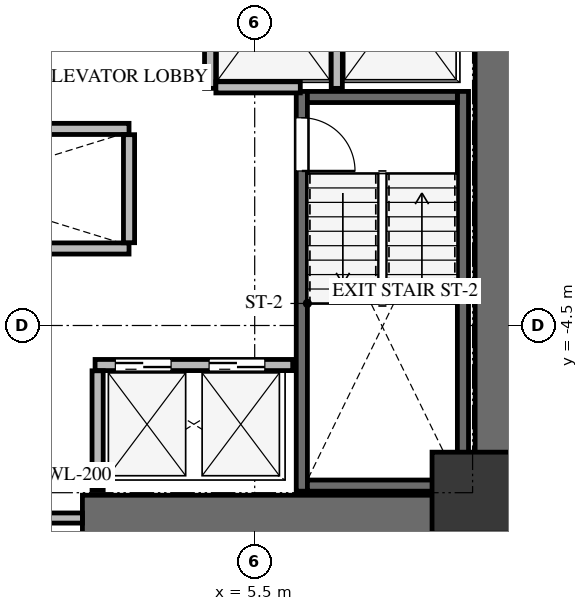
"""IFC4 building model, lengths in metres.
Left out: names, types, materials, properties, quantities, classifications, styles, units other than length and angle.
Written with IfcOpenShell. Run it as: python <this file> out.ifc"""

import sys

from ifc_helpers import new_model, si_unit, direction, frame, frame_2d, origin, origin_2d, place, context, subcontext, project, spatial, rectangle, extrude, source, transform, mapped, element, fill, save


model = new_model("IFC4")
c1 = context("Model", 3, precision=1e-05, world=origin(), true_north=direction((0.0, 1.0)))
c2 = subcontext(c1, "Body", "Model", "MODEL_VIEW")
j1 = project(units=[si_unit("LENGTHUNIT", "METRE"), si_unit("PLANEANGLEUNIT", "RADIAN")], contexts=[c1])
p1 = place(None, origin())
s1 = spatial("IfcSite", under=j1, at=p1, CompositionType="ELEMENT")
p2 = place(p1, origin())
s2 = spatial("IfcBuilding", under=s1, at=p2, CompositionType="ELEMENT")
p3 = place(p2, frame((0.0, 0.0, 42.3)))
s3 = spatial("IfcBuildingStorey", under=s2, at=p3, CompositionType="ELEMENT", Elevation=42.3)
p4 = place(p3, frame((10.3, -8.75, 0.0), z_axis=(0.0, 0.0, 1.0), x_axis=(0.0, 1.0, 0.0)))
e1 = element("IfcWall", 1, at=p4, inside=s3, PredefinedType="SHEAR", context=c2, shape_type="SweptSolid", body=[
    extrude(rectangle(XDim=17.5, YDim=0.9, at=frame_2d((8.75, 0.0))), origin(), (0.0, 0.0, 1.0), 3.3),
])
p5 = place(p3, frame((2.1, -8.3, 0.0), z_axis=(0.0, 0.0, 1.0), x_axis=(1.0, 0.0, 0.0)))
e2 = element("IfcWall", 2, at=p5, inside=s3, PredefinedType="SHEAR", context=c2, shape_type="SweptSolid", body=[
    extrude(rectangle(XDim=7.75, YDim=0.9, at=frame_2d((3.875, 0.0))), origin(), (0.0, 0.0, 1.0), 3.3),
])
p6 = place(p3, frame((9.61, -7.77, -0.24), z_axis=(0.0, 0.0, 1.0), x_axis=(0.0, 1.0, 0.0)))
e3 = element("IfcWall", 3, at=p6, inside=s3, PredefinedType="SHEAR", context=c2, shape_type="SweptSolid", body=[
    extrude(rectangle(XDim=7.89, YDim=0.22, at=frame_2d((3.945, 0.0))), origin(), (0.0, 0.0, 1.0), 3.3),
])
p7 = place(p3, frame((6.43, 0.12, -0.24), z_axis=(0.0, 0.0, 1.0), x_axis=(0.0, -1.0, 0.0)))
e4 = element("IfcWall", 4, at=p7, inside=s3, PredefinedType="SHEAR", context=c2, shape_type="SweptSolid", body=[
    extrude(rectangle(XDim=7.89, YDim=0.22, at=frame_2d((3.945, 0.0))), origin(), (0.0, 0.0, 1.0), 3.3),
])
p8 = place(p7, frame((0.52, 0.0, 0.0)))
e5 = element("IfcOpeningElement", 5, at=p8, cuts=e4, PredefinedType="OPENING", context=c2, shape_type="SweptSolid", body=[
    extrude(rectangle(XDim=1.05, YDim=2.15, at=frame_2d((0.525, 1.075))), frame((0.0, 0.12, 0.0), z_axis=(0.0, -1.0, 0.0), x_axis=(1.0, 0.0, 0.0)), (0.0, 0.0, 1.0), 0.24),
])
for number, where, z_axis, x_axis in (
    (6, (6.54, -7.66, -0.24), (0.0, 0.0, 1.0), (1.0, 0.0, 0.0)),
    (7, (9.5, 0.01, -0.24), (0.0, 0.0, 1.0), (-1.0, 0.0, 0.0)),
):
    element("IfcWall", number, at=place(p3, frame(where, z_axis=z_axis, x_axis=x_axis)), inside=s3, PredefinedType="SHEAR", context=c2, shape_type="SweptSolid", body=[
        extrude(rectangle(XDim=2.96, YDim=0.22, at=frame_2d((1.48, 0.0))), origin(), (0.0, 0.0, 1.0), 3.3),
    ])
m1 = source(origin(), c2, "Body", "SweptSolid", [
    extrude(rectangle(XDim=1.6, YDim=1.6, at=origin_2d()), origin(), (0.0, 0.0, 1.0), 3.3),
])
p9 = place(p3, frame((9.8, -7.8, -0.24), z_axis=(0.0, 0.0, 1.0), x_axis=(1.0, 0.0, 0.0)))
e8 = element("IfcColumn", 8, at=p9, inside=s3, PredefinedType="COLUMN", context=c2, shape_type="MappedRepresentation", body=[
    mapped(m1, transform((0.0, 0.0, 0.0), x_axis=(1.0, 0.0, 0.0), y_axis=(0.0, 1.0, 0.0), z_axis=(0.0, 0.0, 1.0), scale=1.0)),
])
p10 = place(p3, frame((-2.1, -8.3, 0.0), z_axis=(0.0, 0.0, 1.0), x_axis=(1.0, 0.0, 0.0)))
e9 = element("IfcWall", 9, at=p10, inside=s3, PredefinedType="SOLIDWALL", context=c2, shape_type="SweptSolid", body=[
    extrude(rectangle(XDim=4.2, YDim=0.2, at=frame_2d((2.1, 0.0))), origin(), (0.0, 0.0, 1.0), 3.045),
])
p11 = place(p10, frame((1.2, 0.0, 0.0)))
e10 = element("IfcOpeningElement", 10, at=p11, cuts=e9, PredefinedType="OPENING", context=c2, shape_type="SweptSolid", body=[
    extrude(rectangle(XDim=1.8, YDim=2.15, at=frame_2d((0.9, 1.075))), frame((0.0, 0.11, 0.0), z_axis=(0.0, -1.0, 0.0), x_axis=(1.0, 0.0, 0.0)), (0.0, 0.0, 1.0), 0.22),
])
for number, where, z_axis, x_axis in (
    (11, (4.62, 0.18, 0.0), (0.0, 0.0, 1.0), (0.0, 1.0, 0.0)),
    (12, (7.12, 0.18, 0.0), (0.0, 0.0, 1.0), (0.0, 1.0, 0.0)),
):
    element("IfcWall", number, at=place(p3, frame(where, z_axis=z_axis, x_axis=x_axis)), inside=s3, PredefinedType="SOLIDWALL", context=c2, shape_type="SweptSolid", body=[
        extrude(rectangle(XDim=3.186, YDim=0.22, at=frame_2d((1.593, 0.0))), origin(), (0.0, 0.0, 1.0), 3.045),
    ])
p12 = place(p3, frame((4.734, 0.2, 0.0), z_axis=(0.0, 0.0, 1.0), x_axis=(1.0, 0.0, 0.0)))
e13 = element("IfcWall", 13, at=p12, inside=s3, PredefinedType="SOLIDWALL", context=c2, shape_type="SweptSolid", body=[
    extrude(rectangle(XDim=1.666, YDim=0.22, at=frame_2d((0.833, 0.0))), origin(), (0.0, 0.0, 1.0), 3.045),
])
p13 = place(p3, frame((2.35, -5.28, 0.0), z_axis=(0.0, 0.0, 1.0), x_axis=(1.0, 0.0, 0.0)))
e14 = element("IfcWall", 14, at=p13, inside=s3, PredefinedType="SOLIDWALL", context=c2, shape_type="SweptSolid", body=[
    extrude(rectangle(XDim=3.9, YDim=0.22, at=frame_2d((1.95, 0.0))), origin(), (0.0, 0.0, 1.0), 3.045),
])
p14 = place(p13, frame((0.4, 0.0, 0.0)))
e15 = element("IfcOpeningElement", 15, at=p14, cuts=e14, PredefinedType="OPENING", context=c2, shape_type="SweptSolid", body=[
    extrude(rectangle(XDim=1.1, YDim=2.15, at=frame_2d((0.55, 1.075))), frame((0.0, 0.12, 0.0), z_axis=(0.0, -1.0, 0.0), x_axis=(1.0, 0.0, 0.0)), (0.0, 0.0, 1.0), 0.24),
])
p15 = place(p13, frame((2.25, 0.0, 0.0)))
e16 = element("IfcOpeningElement", 16, at=p15, cuts=e14, PredefinedType="OPENING", context=c2, shape_type="SweptSolid", body=[
    extrude(rectangle(XDim=1.1, YDim=2.15, at=frame_2d((0.55, 1.075))), frame((0.0, 0.12, 0.0), z_axis=(0.0, -1.0, 0.0), x_axis=(1.0, 0.0, 0.0)), (0.0, 0.0, 1.0), 0.24),
])
p16 = place(p3, frame((2.4, -7.75, 0.0), z_axis=(0.0, 0.0, 1.0), x_axis=(0.0, 1.0, 0.0)))
e17 = element("IfcWall", 17, at=p16, inside=s3, PredefinedType="SOLIDWALL", context=c2, shape_type="SweptSolid", body=[
    extrude(rectangle(XDim=2.356, YDim=0.22, at=frame_2d((1.178, 0.0))), origin(), (0.0, 0.0, 1.0), 3.045),
])
for number, where, z_axis, x_axis in (
    (18, (-4.22, -2.98, 0.0), (0.0, 0.0, 1.0), (1.0, 0.0, 0.0)),
    (19, (-4.22, -0.62, 0.0), (0.0, 0.0, 1.0), (1.0, 0.0, 0.0)),
):
    element("IfcWall", number, at=place(p3, frame(where, z_axis=z_axis, x_axis=x_axis)), inside=s3, PredefinedType="SOLIDWALL", context=c2, shape_type="SweptSolid", body=[
        extrude(rectangle(XDim=7.24, YDim=0.22, at=frame_2d((3.62, 0.0))), origin(), (0.0, 0.0, 1.0), 3.045),
    ])
p17 = place(p3, frame((3.02, -2.866, 0.0), z_axis=(0.0, 0.0, 1.0), x_axis=(0.0, 1.0, 0.0)))
e20 = element("IfcWall", 20, at=p17, inside=s3, PredefinedType="SOLIDWALL", context=c2, shape_type="SweptSolid", body=[
    extrude(rectangle(XDim=2.132, YDim=0.22, at=frame_2d((1.066, 0.0))), origin(), (0.0, 0.0, 1.0), 3.045),
])
m2 = source(origin(), c2, "Body", "SweptSolid", [
    extrude(rectangle(XDim=1.05, YDim=2.15, at=frame_2d((0.525, 1.075))), frame((0.0, 0.025, 0.0), z_axis=(0.0, -1.0, 0.0), x_axis=(1.0, 0.0, 0.0)), (0.0, 0.0, 1.0), 0.05),
])
p18 = place(p8, origin())
e21 = element("IfcDoor", 21, at=p18, inside=s3, OperationType="SINGLE_SWING_RIGHT", PredefinedType="DOOR", context=c2, shape_type="MappedRepresentation", body=[
    mapped(m2, transform((0.0, 0.0, 0.0), x_axis=(1.0, 0.0, 0.0), y_axis=(0.0, 1.0, 0.0), z_axis=(0.0, 0.0, 1.0), scale=1.0)),
])
fill(e5, e21)
m3 = source(origin(), c2, "Body", "SweptSolid", [
    extrude(rectangle(XDim=1.1, YDim=2.15, at=frame_2d((0.55, 1.075))), frame((0.0, 0.025, 0.0), z_axis=(0.0, -1.0, 0.0), x_axis=(1.0, 0.0, 0.0)), (0.0, 0.0, 1.0), 0.05),
])
p19 = place(p14, origin())
e22 = element("IfcDoor", 22, at=p19, inside=s3, OperationType="DOUBLE_DOOR_SLIDING", PredefinedType="DOOR", context=c2, shape_type="MappedRepresentation", body=[
    mapped(m3, transform((0.0, 0.0, 0.0), x_axis=(1.0, 0.0, 0.0), y_axis=(0.0, 1.0, 0.0), z_axis=(0.0, 0.0, 1.0), scale=1.0)),
])
fill(e15, e22)
p20 = place(p15, origin())
e23 = element("IfcDoor", 23, at=p20, inside=s3, OperationType="DOUBLE_DOOR_SLIDING", PredefinedType="DOOR", context=c2, shape_type="MappedRepresentation", body=[
    mapped(m3, transform((0.0, 0.0, 0.0), x_axis=(1.0, 0.0, 0.0), y_axis=(0.0, 1.0, 0.0), z_axis=(0.0, 0.0, 1.0), scale=1.0)),
])
fill(e16, e23)
save(model, sys.argv[1])
